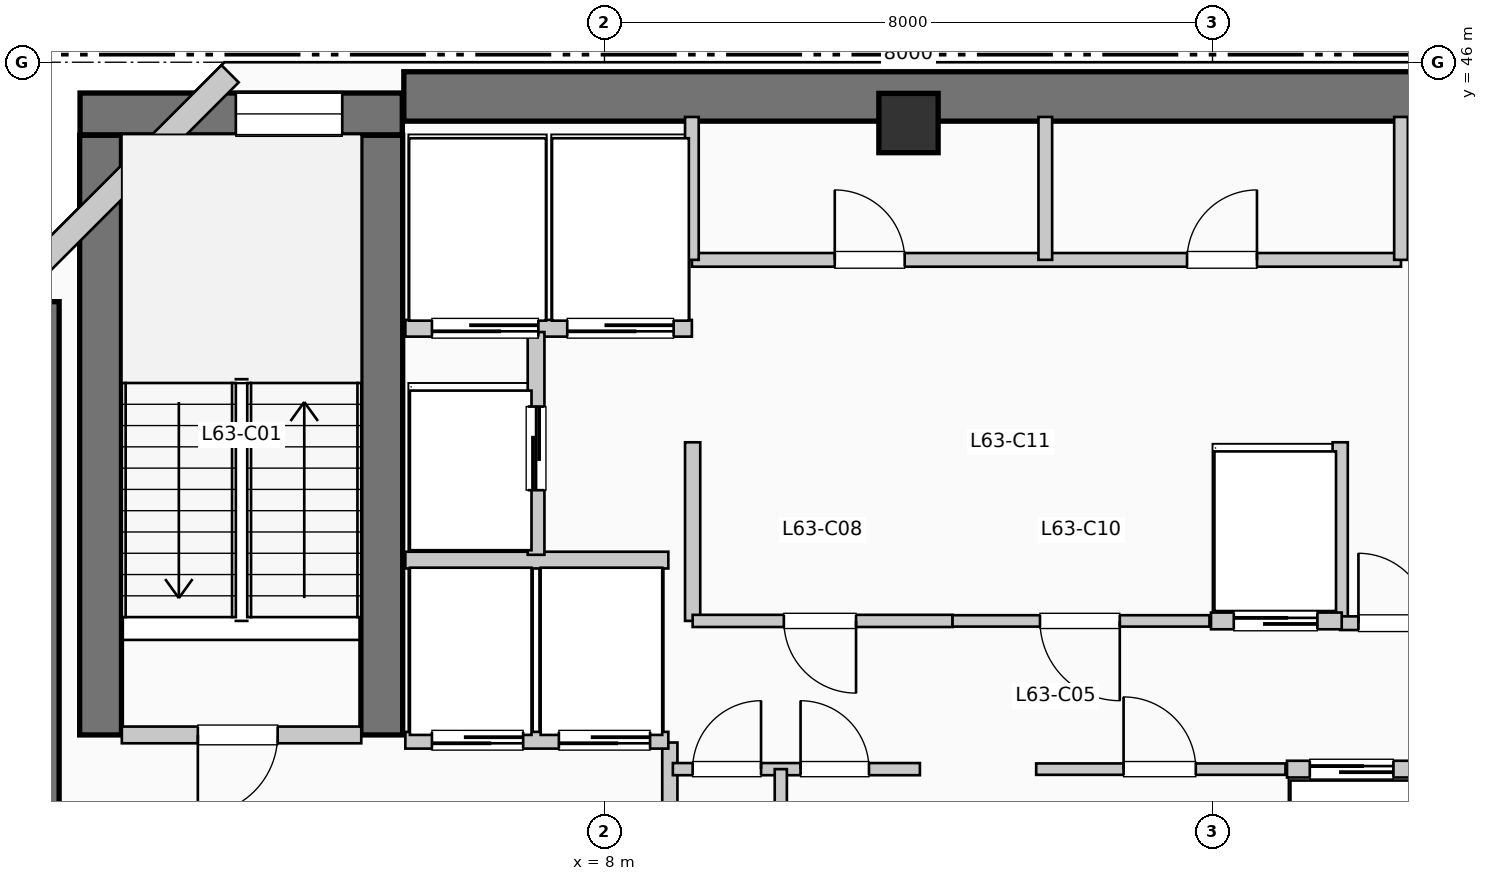
"""IFC4 building model, lengths in metres.
Left out: names, types, materials, properties, quantities, classifications, styles, units other than length and angle.
Written with IfcOpenShell. Run it as: python <this file> out.ifc"""

import sys

from ifc_helpers import new_model, si_unit, direction, frame, frame_2d, origin, origin_2d, place, context, subcontext, project, spatial, rectangle, extrude, element, fill, save


model = new_model("IFC4")
c1 = context("Model", 3, precision=1e-05, world=origin(), true_north=direction((0.0, 1.0)))
c2 = subcontext(c1, "Body", "Model", "MODEL_VIEW")
j1 = project(units=[si_unit("LENGTHUNIT", "METRE"), si_unit("PLANEANGLEUNIT", "RADIAN")], contexts=[c1])
p1 = place(None, origin())
s1 = spatial("IfcSite", under=j1, at=p1, CompositionType="ELEMENT")
p2 = place(p1, origin())
s2 = spatial("IfcBuilding", under=s1, at=p2, CompositionType="ELEMENT")
p3 = place(p2, frame((0.0, 0.0, 260.37)))
s3 = spatial("IfcBuildingStorey", under=s2, at=p3, CompositionType="ELEMENT", Elevation=260.37)
p4 = place(p3, frame((5.36, 45.55, 0.0), z_axis=(0.0, 0.0, 1.0), x_axis=(1.0, 0.0, 0.0)))
e1 = element("IfcWall", 1, at=p4, inside=s3, PredefinedType="SHEAR", context=c2, shape_type="SweptSolid", body=[
    extrude(rectangle(XDim=13.98, YDim=0.65, at=frame_2d((6.99, 0.0))), origin(), (0.0, 0.0, 1.0), 3.96),
])
p5 = place(p3, frame((0.5, 34.95, 0.0), z_axis=(0.0, 0.0, 1.0), x_axis=(0.0, 1.0, 0.0)))
e2 = element("IfcWall", 2, at=p5, inside=s3, PredefinedType="SHEAR", context=c2, shape_type="SweptSolid", body=[
    extrude(rectangle(XDim=7.9, YDim=0.65, at=frame_2d((3.95, 0.0))), origin(), (0.0, 0.0, 1.0), 3.96),
])
for number, where, z_axis, x_axis in (
    (3, (1.37, 37.15, 0.0), (0.0, 0.0, 1.0), (0.0, 1.0, 0.0)),
    (4, (5.07, 37.15, 0.0), (0.0, 0.0, 1.0), (0.0, 1.0, 0.0)),
):
    element("IfcWall", number, at=place(p3, frame(where, z_axis=z_axis, x_axis=x_axis)), inside=s3, PredefinedType="SHEAR", context=c2, shape_type="SweptSolid", body=[
        extrude(rectangle(XDim=7.89, YDim=0.55, at=frame_2d((3.945, 0.0))), origin(), (0.0, 0.0, 1.0), 3.96),
    ])
p6 = place(p3, frame((1.1, 45.32, 0.0), z_axis=(0.0, 0.0, 1.0), x_axis=(1.0, 0.0, 0.0)))
e5 = element("IfcWall", 5, at=p6, inside=s3, PredefinedType="SHEAR", context=c2, shape_type="SweptSolid", body=[
    extrude(rectangle(XDim=4.24, YDim=0.55, at=frame_2d((2.12, 0.0))), origin(), (0.0, 0.0, 1.0), 3.96),
])
p7 = place(p6, frame((2.05, 0.0, 1.05)))
e6 = element("IfcOpeningElement", 6, at=p7, cuts=e5, PredefinedType="OPENING", context=c2, shape_type="SweptSolid", body=[
    extrude(rectangle(XDim=1.4, YDim=1.8, at=frame_2d((0.7, 0.9))), frame((0.0, 0.285, 0.0), z_axis=(0.0, -1.0, 0.0), x_axis=(1.0, 0.0, 0.0)), (0.0, 0.0, 1.0), 0.57),
])
p8 = place(p3, frame((12.0, 45.2, 0.0), z_axis=(0.0, 0.0, 1.0), x_axis=(1.0, 0.0, 0.0)))
e7 = element("IfcColumn", 7, at=p8, inside=s3, PredefinedType="COLUMN", context=c2, shape_type="SweptSolid", body=[
    extrude(rectangle(XDim=0.78, YDim=0.78, at=origin_2d()), origin(), (0.0, 0.0, 1.0), 3.96),
])
p9 = place(p3, frame((3.074, 45.848, 0.0), z_axis=(0.0, 0.0, 1.0), x_axis=(-0.707106781187, -0.707106781187, 0.0)))
e8 = element("IfcWall", 8, at=p9, inside=s3, PredefinedType="SOLIDWALL", context=c2, shape_type="SweptSolid", body=[
    extrude(rectangle(XDim=4.133, YDim=0.32, at=frame_2d((2.066, 0.0))), origin(), (0.0, 0.0, 1.0), 3.71),
])
p10 = place(p3, frame((1.65, 37.15, 0.0), z_axis=(0.0, 0.0, 1.0), x_axis=(1.0, 0.0, 0.0)))
e9 = element("IfcWall", 9, at=p10, inside=s3, PredefinedType="PARTITIONING", context=c2, shape_type="SweptSolid", body=[
    extrude(rectangle(XDim=3.15, YDim=0.22, at=frame_2d((1.575, 0.0))), origin(), (0.0, 0.0, 1.0), 3.71),
])
p11 = place(p10, frame((2.05, 0.0, 0.0), z_axis=(0.0, 0.0, 1.0), x_axis=(-1.0, 0.0, 0.0)))
e10 = element("IfcOpeningElement", 10, at=p11, cuts=e9, PredefinedType="OPENING", context=c2, shape_type="SweptSolid", body=[
    extrude(rectangle(XDim=1.05, YDim=2.15, at=frame_2d((0.525, 1.075))), frame((0.0, 0.12, 0.0), z_axis=(0.0, -1.0, 0.0), x_axis=(1.0, 0.0, 0.0)), (0.0, 0.0, 1.0), 0.24),
])
p12 = place(p3, frame((8.86, 34.55, 0.0), z_axis=(0.0, 0.0, 1.0), x_axis=(0.0, 1.0, 0.0)))
e11 = element("IfcWall", 11, at=p12, inside=s3, PredefinedType="PARTITIONING", context=c2, shape_type="SweptSolid", body=[
    extrude(rectangle(XDim=2.5, YDim=0.2, at=frame_2d((1.25, 0.0))), origin(), (0.0, 0.0, 1.0), 3.71),
])
p13 = place(p3, frame((5.38, 37.08, 0.0), z_axis=(0.0, 0.0, 1.0), x_axis=(1.0, 0.0, 0.0)))
e12 = element("IfcWall", 12, at=p13, inside=s3, PredefinedType="PARTITIONING", context=c2, shape_type="SweptSolid", body=[
    extrude(rectangle(XDim=3.46, YDim=0.22, at=frame_2d((1.73, 0.0))), origin(), (0.0, 0.0, 1.0), 3.71),
])
p14 = place(p13, frame((1.55, 0.0, 0.0), z_axis=(0.0, 0.0, 1.0), x_axis=(-1.0, 0.0, 0.0)))
e13 = element("IfcOpeningElement", 13, at=p14, cuts=e12, PredefinedType="OPENING", context=c2, shape_type="SweptSolid", body=[
    extrude(rectangle(XDim=1.2, YDim=2.2, at=frame_2d((0.6, 1.1))), frame((0.0, 0.12, 0.0), z_axis=(0.0, -1.0, 0.0), x_axis=(1.0, 0.0, 0.0)), (0.0, 0.0, 1.0), 0.24),
])
p15 = place(p13, frame((3.22, 0.0, 0.0), z_axis=(0.0, 0.0, 1.0), x_axis=(-1.0, 0.0, 0.0)))
e14 = element("IfcOpeningElement", 14, at=p15, cuts=e12, PredefinedType="OPENING", context=c2, shape_type="SweptSolid", body=[
    extrude(rectangle(XDim=1.2, YDim=2.2, at=frame_2d((0.6, 1.1))), frame((0.0, 0.12, 0.0), z_axis=(0.0, -1.0, 0.0), x_axis=(1.0, 0.0, 0.0)), (0.0, 0.0, 1.0), 0.24),
])
p16 = place(p3, frame((5.38, 39.45, 0.0), z_axis=(0.0, 0.0, 1.0), x_axis=(1.0, 0.0, 0.0)))
e15 = element("IfcWall", 15, at=p16, inside=s3, PredefinedType="PARTITIONING", context=c2, shape_type="SweptSolid", body=[
    extrude(rectangle(XDim=3.46, YDim=0.22, at=frame_2d((1.73, 0.0))), origin(), (0.0, 0.0, 1.0), 3.71),
])
p17 = place(p3, frame((5.38, 42.5, 0.0), z_axis=(0.0, 0.0, 1.0), x_axis=(1.0, 0.0, 0.0)))
e16 = element("IfcWall", 16, at=p17, inside=s3, PredefinedType="PARTITIONING", context=c2, shape_type="SweptSolid", body=[
    extrude(rectangle(XDim=3.77, YDim=0.22, at=frame_2d((1.885, 0.0))), origin(), (0.0, 0.0, 1.0), 3.71),
])
p18 = place(p17, frame((1.75, 0.0, 0.0), z_axis=(0.0, 0.0, 1.0), x_axis=(-1.0, 0.0, 0.0)))
e17 = element("IfcOpeningElement", 17, at=p18, cuts=e16, PredefinedType="OPENING", context=c2, shape_type="SweptSolid", body=[
    extrude(rectangle(XDim=1.4, YDim=2.2, at=frame_2d((0.7, 1.1))), frame((0.0, 0.12, 0.0), z_axis=(0.0, -1.0, 0.0), x_axis=(1.0, 0.0, 0.0)), (0.0, 0.0, 1.0), 0.24),
])
p19 = place(p17, frame((3.53, 0.0, 0.0), z_axis=(0.0, 0.0, 1.0), x_axis=(-1.0, 0.0, 0.0)))
e18 = element("IfcOpeningElement", 18, at=p19, cuts=e16, PredefinedType="OPENING", context=c2, shape_type="SweptSolid", body=[
    extrude(rectangle(XDim=1.4, YDim=2.2, at=frame_2d((0.7, 1.1))), frame((0.0, 0.12, 0.0), z_axis=(0.0, -1.0, 0.0), x_axis=(1.0, 0.0, 0.0)), (0.0, 0.0, 1.0), 0.24),
])
p20 = place(p3, frame((7.1, 39.52, 0.0), z_axis=(0.0, 0.0, 1.0), x_axis=(0.0, 1.0, 0.0)))
e19 = element("IfcWall", 19, at=p20, inside=s3, PredefinedType="PARTITIONING", context=c2, shape_type="SweptSolid", body=[
    extrude(rectangle(XDim=2.93, YDim=0.22, at=frame_2d((1.465, 0.0))), origin(), (0.0, 0.0, 1.0), 3.71),
])
p21 = place(p20, frame((0.85, 0.0, 0.0)))
e20 = element("IfcOpeningElement", 20, at=p21, cuts=e19, PredefinedType="OPENING", context=c2, shape_type="SweptSolid", body=[
    extrude(rectangle(XDim=1.1, YDim=2.2, at=frame_2d((0.55, 1.1))), frame((0.0, 0.12, 0.0), z_axis=(0.0, -1.0, 0.0), x_axis=(1.0, 0.0, 0.0)), (0.0, 0.0, 1.0), 0.24),
])
for number, where, z_axis, x_axis in (
    (21, (9.16, 38.65, 0.0), (0.0, 0.0, 1.0), (0.0, 1.0, 0.0)),
    (22, (17.68, 38.65, 0.0), (0.0, 0.0, 1.0), (0.0, 1.0, 0.0)),
):
    element("IfcWall", number, at=place(p3, frame(where, z_axis=z_axis, x_axis=x_axis)), inside=s3, PredefinedType="PARTITIONING", context=c2, shape_type="SweptSolid", body=[
        extrude(rectangle(XDim=2.35, YDim=0.2, at=frame_2d((1.175, 0.0))), origin(), (0.0, 0.0, 1.0), 3.71),
    ])
p22 = place(p3, frame((17.68, 38.62, 0.0), z_axis=(0.0, 0.0, 1.0), x_axis=(1.0, 0.0, 0.0)))
e23 = element("IfcWall", 23, at=p22, inside=s3, PredefinedType="PARTITIONING", context=c2, shape_type="SweptSolid", body=[
    extrude(rectangle(XDim=1.84, YDim=0.18, at=frame_2d((0.92, 0.0))), origin(), (0.0, 0.0, 1.0), 3.71),
])
p23 = place(p22, frame((0.24, 0.0, 0.0)))
e24 = element("IfcOpeningElement", 24, at=p23, cuts=e23, PredefinedType="OPENING", context=c2, shape_type="SweptSolid", body=[
    extrude(rectangle(XDim=0.92, YDim=2.1, at=frame_2d((0.46, 1.05))), frame((0.0, 0.1, 0.0), z_axis=(0.0, -1.0, 0.0), x_axis=(1.0, 0.0, 0.0)), (0.0, 0.0, 1.0), 0.2),
])
p24 = place(p3, frame((8.9, 36.7, 0.0), z_axis=(0.0, 0.0, 1.0), x_axis=(1.0, 0.0, 0.0)))
e25 = element("IfcWall", 25, at=p24, inside=s3, PredefinedType="PARTITIONING", context=c2, shape_type="SweptSolid", body=[
    extrude(rectangle(XDim=3.25, YDim=0.16, at=frame_2d((1.625, 0.0))), origin(), (0.0, 0.0, 1.0), 3.71),
])
p25 = place(p24, frame((0.26, 0.0, 0.0)))
e26 = element("IfcOpeningElement", 26, at=p25, cuts=e25, PredefinedType="OPENING", context=c2, shape_type="SweptSolid", body=[
    extrude(rectangle(XDim=0.9, YDim=2.15, at=frame_2d((0.45, 1.075))), frame((0.0, 0.09, 0.0), z_axis=(0.0, -1.0, 0.0), x_axis=(1.0, 0.0, 0.0)), (0.0, 0.0, 1.0), 0.18),
])
p26 = place(p24, frame((1.68, 0.0, 0.0)))
e27 = element("IfcOpeningElement", 27, at=p26, cuts=e25, PredefinedType="OPENING", context=c2, shape_type="SweptSolid", body=[
    extrude(rectangle(XDim=0.9, YDim=2.15, at=frame_2d((0.45, 1.075))), frame((0.0, 0.09, 0.0), z_axis=(0.0, -1.0, 0.0), x_axis=(1.0, 0.0, 0.0)), (0.0, 0.0, 1.0), 0.18),
])
p27 = place(p3, frame((10.32, 34.55, 0.0), z_axis=(0.0, 0.0, 1.0), x_axis=(0.0, 1.0, 0.0)))
e28 = element("IfcWall", 28, at=p27, inside=s3, PredefinedType="PARTITIONING", context=c2, shape_type="SweptSolid", body=[
    extrude(rectangle(XDim=2.15, YDim=0.16, at=frame_2d((1.075, 0.0))), origin(), (0.0, 0.0, 1.0), 3.71),
])
p28 = place(p3, frame((9.16, 38.65, 0.0), z_axis=(0.0, 0.0, 1.0), x_axis=(1.0, 0.0, 0.0)))
e29 = element("IfcWall", 29, at=p28, inside=s3, PredefinedType="PARTITIONING", context=c2, shape_type="SweptSolid", body=[
    extrude(rectangle(XDim=3.42, YDim=0.16, at=frame_2d((1.71, 0.0))), origin(), (0.0, 0.0, 1.0), 3.71),
])
p29 = place(p28, frame((2.15, 0.0, 0.0), z_axis=(0.0, 0.0, 1.0), x_axis=(-1.0, 0.0, 0.0)))
e30 = element("IfcOpeningElement", 30, at=p29, cuts=e29, PredefinedType="OPENING", context=c2, shape_type="SweptSolid", body=[
    extrude(rectangle(XDim=0.95, YDim=2.15, at=frame_2d((0.475, 1.075))), frame((0.0, 0.09, 0.0), z_axis=(0.0, -1.0, 0.0), x_axis=(1.0, 0.0, 0.0)), (0.0, 0.0, 1.0), 0.18),
])
p30 = place(p3, frame((13.68, 36.7, 0.0), z_axis=(0.0, 0.0, 1.0), x_axis=(1.0, 0.0, 0.0)))
e31 = element("IfcWall", 31, at=p30, inside=s3, PredefinedType="PARTITIONING", context=c2, shape_type="SweptSolid", body=[
    extrude(rectangle(XDim=3.28, YDim=0.15, at=frame_2d((1.64, 0.0))), origin(), (0.0, 0.0, 1.0), 3.71),
])
p31 = place(p30, frame((1.15, 0.0, 0.0)))
e32 = element("IfcOpeningElement", 32, at=p31, cuts=e31, PredefinedType="OPENING", context=c2, shape_type="SweptSolid", body=[
    extrude(rectangle(XDim=0.95, YDim=2.15, at=frame_2d((0.475, 1.075))), frame((0.0, 0.085, 0.0), z_axis=(0.0, -1.0, 0.0), x_axis=(1.0, 0.0, 0.0)), (0.0, 0.0, 1.0), 0.17),
])
p32 = place(p3, frame((12.58, 38.65, 0.0), z_axis=(0.0, 0.0, 1.0), x_axis=(1.0, 0.0, 0.0)))
e33 = element("IfcWall", 33, at=p32, inside=s3, PredefinedType="PARTITIONING", context=c2, shape_type="SweptSolid", body=[
    extrude(rectangle(XDim=3.38, YDim=0.15, at=frame_2d((1.69, 0.0))), origin(), (0.0, 0.0, 1.0), 3.71),
])
p33 = place(p32, frame((2.2, 0.0, 0.0), z_axis=(0.0, 0.0, 1.0), x_axis=(-1.0, 0.0, 0.0)))
e34 = element("IfcOpeningElement", 34, at=p33, cuts=e33, PredefinedType="OPENING", context=c2, shape_type="SweptSolid", body=[
    extrude(rectangle(XDim=1.05, YDim=2.15, at=frame_2d((0.525, 1.075))), frame((0.0, 0.085, 0.0), z_axis=(0.0, -1.0, 0.0), x_axis=(1.0, 0.0, 0.0)), (0.0, 0.0, 1.0), 0.17),
])
p34 = place(p3, frame((16.98, 36.7, 0.0), z_axis=(0.0, 0.0, 1.0), x_axis=(1.0, 0.0, 0.0)))
e35 = element("IfcWall", 35, at=p34, inside=s3, PredefinedType="PARTITIONING", context=c2, shape_type="SweptSolid", body=[
    extrude(rectangle(XDim=1.7, YDim=0.22, at=frame_2d((0.85, 0.0))), origin(), (0.0, 0.0, 1.0), 3.71),
])
p35 = place(p34, frame((0.3, 0.0, 0.0)))
e36 = element("IfcOpeningElement", 36, at=p35, cuts=e35, PredefinedType="OPENING", context=c2, shape_type="SweptSolid", body=[
    extrude(rectangle(XDim=1.1, YDim=2.2, at=frame_2d((0.55, 1.1))), frame((0.0, 0.12, 0.0), z_axis=(0.0, -1.0, 0.0), x_axis=(1.0, 0.0, 0.0)), (0.0, 0.0, 1.0), 0.24),
])
p36 = place(p3, frame((15.98, 38.65, 0.0), z_axis=(0.0, 0.0, 1.0), x_axis=(1.0, 0.0, 0.0)))
e37 = element("IfcWall", 37, at=p36, inside=s3, PredefinedType="PARTITIONING", context=c2, shape_type="SweptSolid", body=[
    extrude(rectangle(XDim=1.72, YDim=0.22, at=frame_2d((0.86, 0.0))), origin(), (0.0, 0.0, 1.0), 3.71),
])
p37 = place(p36, frame((0.3, 0.0, 0.0)))
e38 = element("IfcOpeningElement", 38, at=p37, cuts=e37, PredefinedType="OPENING", context=c2, shape_type="SweptSolid", body=[
    extrude(rectangle(XDim=1.1, YDim=2.2, at=frame_2d((0.55, 1.1))), frame((0.0, 0.12, 0.0), z_axis=(0.0, -1.0, 0.0), x_axis=(1.0, 0.0, 0.0)), (0.0, 0.0, 1.0), 0.24),
])
p38 = place(p3, frame((9.15, 43.4, 0.0), z_axis=(0.0, 0.0, 1.0), x_axis=(1.0, 0.0, 0.0)))
e39 = element("IfcWall", 39, at=p38, inside=s3, PredefinedType="PLUMBINGWALL", context=c2, shape_type="SweptSolid", body=[
    extrude(rectangle(XDim=9.33, YDim=0.18, at=frame_2d((4.665, 0.0))), origin(), (0.0, 0.0, 1.0), 3.71),
])
p39 = place(p38, frame((1.88, 0.0, 0.0)))
e40 = element("IfcOpeningElement", 40, at=p39, cuts=e39, PredefinedType="OPENING", context=c2, shape_type="SweptSolid", body=[
    extrude(rectangle(XDim=0.92, YDim=2.1, at=frame_2d((0.46, 1.05))), frame((0.0, 0.1, 0.0), z_axis=(0.0, -1.0, 0.0), x_axis=(1.0, 0.0, 0.0)), (0.0, 0.0, 1.0), 0.2),
])
p40 = place(p38, frame((6.515, 0.0, 0.0)))
e41 = element("IfcOpeningElement", 41, at=p40, cuts=e39, PredefinedType="OPENING", context=c2, shape_type="SweptSolid", body=[
    extrude(rectangle(XDim=0.92, YDim=2.1, at=frame_2d((0.46, 1.05))), frame((0.0, 0.1, 0.0), z_axis=(0.0, -1.0, 0.0), x_axis=(1.0, 0.0, 0.0)), (0.0, 0.0, 1.0), 0.2),
])
for number, where, z_axis, x_axis in (
    (42, (9.15, 43.4, 0.0), (0.0, 0.0, 1.0), (0.0, 1.0, 0.0)),
    (43, (18.48, 43.4, 0.0), (0.0, 0.0, 1.0), (0.0, 1.0, 0.0)),
    (44, (13.8, 43.4, 0.0), (0.0, 0.0, 1.0), (0.0, 1.0, 0.0)),
):
    element("IfcWall", number, at=place(p3, frame(where, z_axis=z_axis, x_axis=x_axis)), inside=s3, PredefinedType="PLUMBINGWALL", context=c2, shape_type="SweptSolid", body=[
        extrude(rectangle(XDim=1.88, YDim=0.18, at=frame_2d((0.94, 0.0))), origin(), (0.0, 0.0, 1.0), 3.71),
    ])
p41 = place(p7, origin())
e45 = element("IfcWindow", 45, at=p41, inside=s3, PartitioningType="SINGLE_PANEL", PredefinedType="WINDOW", context=c2, shape_type="SweptSolid", body=[
    extrude(rectangle(XDim=1.4, YDim=1.8, at=frame_2d((0.7, 0.9))), frame((0.0, 0.03, 0.0), z_axis=(0.0, -1.0, 0.0), x_axis=(1.0, 0.0, 0.0)), (0.0, 0.0, 1.0), 0.06),
])
fill(e6, e45)
p42 = place(p11, origin())
e46 = element("IfcDoor", 46, at=p42, inside=s3, OperationType="SINGLE_SWING_LEFT", PredefinedType="DOOR", context=c2, shape_type="SweptSolid", body=[
    extrude(rectangle(XDim=1.05, YDim=2.15, at=frame_2d((0.525, 1.075))), frame((0.0, 0.025, 0.0), z_axis=(0.0, -1.0, 0.0), x_axis=(1.0, 0.0, 0.0)), (0.0, 0.0, 1.0), 0.05),
])
fill(e10, e46)
p43 = place(p14, origin())
e47 = element("IfcDoor", 47, at=p43, inside=s3, OperationType="SLIDING_TO_RIGHT", PredefinedType="DOOR", context=c2, shape_type="SweptSolid", body=[
    extrude(rectangle(XDim=1.2, YDim=2.2, at=frame_2d((0.6, 1.1))), frame((0.0, 0.025, 0.0), z_axis=(0.0, -1.0, 0.0), x_axis=(1.0, 0.0, 0.0)), (0.0, 0.0, 1.0), 0.05),
])
fill(e13, e47)
p44 = place(p15, origin())
e48 = element("IfcDoor", 48, at=p44, inside=s3, OperationType="SLIDING_TO_RIGHT", PredefinedType="DOOR", context=c2, shape_type="SweptSolid", body=[
    extrude(rectangle(XDim=1.2, YDim=2.2, at=frame_2d((0.6, 1.1))), frame((0.0, 0.025, 0.0), z_axis=(0.0, -1.0, 0.0), x_axis=(1.0, 0.0, 0.0)), (0.0, 0.0, 1.0), 0.05),
])
fill(e14, e48)
p45 = place(p18, origin())
e49 = element("IfcDoor", 49, at=p45, inside=s3, OperationType="SLIDING_TO_LEFT", PredefinedType="DOOR", context=c2, shape_type="SweptSolid", body=[
    extrude(rectangle(XDim=1.4, YDim=2.2, at=frame_2d((0.7, 1.1))), frame((0.0, 0.025, 0.0), z_axis=(0.0, -1.0, 0.0), x_axis=(1.0, 0.0, 0.0)), (0.0, 0.0, 1.0), 0.05),
])
fill(e17, e49)
p46 = place(p19, origin())
e50 = element("IfcDoor", 50, at=p46, inside=s3, OperationType="SLIDING_TO_LEFT", PredefinedType="DOOR", context=c2, shape_type="SweptSolid", body=[
    extrude(rectangle(XDim=1.4, YDim=2.2, at=frame_2d((0.7, 1.1))), frame((0.0, 0.025, 0.0), z_axis=(0.0, -1.0, 0.0), x_axis=(1.0, 0.0, 0.0)), (0.0, 0.0, 1.0), 0.05),
])
fill(e18, e50)
p47 = place(p21, origin())
e51 = element("IfcDoor", 51, at=p47, inside=s3, OperationType="SLIDING_TO_LEFT", PredefinedType="DOOR", context=c2, shape_type="SweptSolid", body=[
    extrude(rectangle(XDim=1.1, YDim=2.2, at=frame_2d((0.55, 1.1))), frame((0.0, 0.025, 0.0), z_axis=(0.0, -1.0, 0.0), x_axis=(1.0, 0.0, 0.0)), (0.0, 0.0, 1.0), 0.05),
])
fill(e20, e51)
p48 = place(p23, origin())
e52 = element("IfcDoor", 52, at=p48, inside=s3, OperationType="SINGLE_SWING_LEFT", PredefinedType="DOOR", context=c2, shape_type="SweptSolid", body=[
    extrude(rectangle(XDim=0.92, YDim=2.1, at=frame_2d((0.46, 1.05))), frame((0.0, 0.025, 0.0), z_axis=(0.0, -1.0, 0.0), x_axis=(1.0, 0.0, 0.0)), (0.0, 0.0, 1.0), 0.05),
])
fill(e24, e52)
p49 = place(p25, origin())
e53 = element("IfcDoor", 53, at=p49, inside=s3, OperationType="SINGLE_SWING_RIGHT", PredefinedType="DOOR", context=c2, shape_type="SweptSolid", body=[
    extrude(rectangle(XDim=0.9, YDim=2.15, at=frame_2d((0.45, 1.075))), frame((0.0, 0.025, 0.0), z_axis=(0.0, -1.0, 0.0), x_axis=(1.0, 0.0, 0.0)), (0.0, 0.0, 1.0), 0.05),
])
fill(e26, e53)
p50 = place(p26, origin())
e54 = element("IfcDoor", 54, at=p50, inside=s3, OperationType="SINGLE_SWING_LEFT", PredefinedType="DOOR", context=c2, shape_type="SweptSolid", body=[
    extrude(rectangle(XDim=0.9, YDim=2.15, at=frame_2d((0.45, 1.075))), frame((0.0, 0.025, 0.0), z_axis=(0.0, -1.0, 0.0), x_axis=(1.0, 0.0, 0.0)), (0.0, 0.0, 1.0), 0.05),
])
fill(e27, e54)
p51 = place(p29, origin())
e55 = element("IfcDoor", 55, at=p51, inside=s3, OperationType="SINGLE_SWING_RIGHT", PredefinedType="DOOR", context=c2, shape_type="SweptSolid", body=[
    extrude(rectangle(XDim=0.95, YDim=2.15, at=frame_2d((0.475, 1.075))), frame((0.0, 0.025, 0.0), z_axis=(0.0, -1.0, 0.0), x_axis=(1.0, 0.0, 0.0)), (0.0, 0.0, 1.0), 0.05),
])
fill(e30, e55)
p52 = place(p31, origin())
e56 = element("IfcDoor", 56, at=p52, inside=s3, OperationType="SINGLE_SWING_LEFT", PredefinedType="DOOR", context=c2, shape_type="SweptSolid", body=[
    extrude(rectangle(XDim=0.95, YDim=2.15, at=frame_2d((0.475, 1.075))), frame((0.0, 0.025, 0.0), z_axis=(0.0, -1.0, 0.0), x_axis=(1.0, 0.0, 0.0)), (0.0, 0.0, 1.0), 0.05),
])
fill(e32, e56)
p53 = place(p33, origin())
e57 = element("IfcDoor", 57, at=p53, inside=s3, OperationType="SINGLE_SWING_RIGHT", PredefinedType="DOOR", context=c2, shape_type="SweptSolid", body=[
    extrude(rectangle(XDim=1.05, YDim=2.15, at=frame_2d((0.525, 1.075))), frame((0.0, 0.025, 0.0), z_axis=(0.0, -1.0, 0.0), x_axis=(1.0, 0.0, 0.0)), (0.0, 0.0, 1.0), 0.05),
])
fill(e34, e57)
p54 = place(p35, origin())
e58 = element("IfcDoor", 58, at=p54, inside=s3, OperationType="SLIDING_TO_LEFT", PredefinedType="DOOR", context=c2, shape_type="SweptSolid", body=[
    extrude(rectangle(XDim=1.1, YDim=2.2, at=frame_2d((0.55, 1.1))), frame((0.0, 0.025, 0.0), z_axis=(0.0, -1.0, 0.0), x_axis=(1.0, 0.0, 0.0)), (0.0, 0.0, 1.0), 0.05),
])
fill(e36, e58)
p55 = place(p37, origin())
e59 = element("IfcDoor", 59, at=p55, inside=s3, OperationType="SLIDING_TO_LEFT", PredefinedType="DOOR", context=c2, shape_type="SweptSolid", body=[
    extrude(rectangle(XDim=1.1, YDim=2.2, at=frame_2d((0.55, 1.1))), frame((0.0, 0.025, 0.0), z_axis=(0.0, -1.0, 0.0), x_axis=(1.0, 0.0, 0.0)), (0.0, 0.0, 1.0), 0.05),
])
fill(e38, e59)
p56 = place(p39, origin())
e60 = element("IfcDoor", 60, at=p56, inside=s3, OperationType="SINGLE_SWING_LEFT", PredefinedType="DOOR", context=c2, shape_type="SweptSolid", body=[
    extrude(rectangle(XDim=0.92, YDim=2.1, at=frame_2d((0.46, 1.05))), frame((0.0, 0.025, 0.0), z_axis=(0.0, -1.0, 0.0), x_axis=(1.0, 0.0, 0.0)), (0.0, 0.0, 1.0), 0.05),
])
fill(e40, e60)
p57 = place(p40, origin())
e61 = element("IfcDoor", 61, at=p57, inside=s3, OperationType="SINGLE_SWING_RIGHT", PredefinedType="DOOR", context=c2, shape_type="SweptSolid", body=[
    extrude(rectangle(XDim=0.92, YDim=2.1, at=frame_2d((0.46, 1.05))), frame((0.0, 0.025, 0.0), z_axis=(0.0, -1.0, 0.0), x_axis=(1.0, 0.0, 0.0)), (0.0, 0.0, 1.0), 0.05),
])
fill(e41, e61)
save(model, sys.argv[1])
